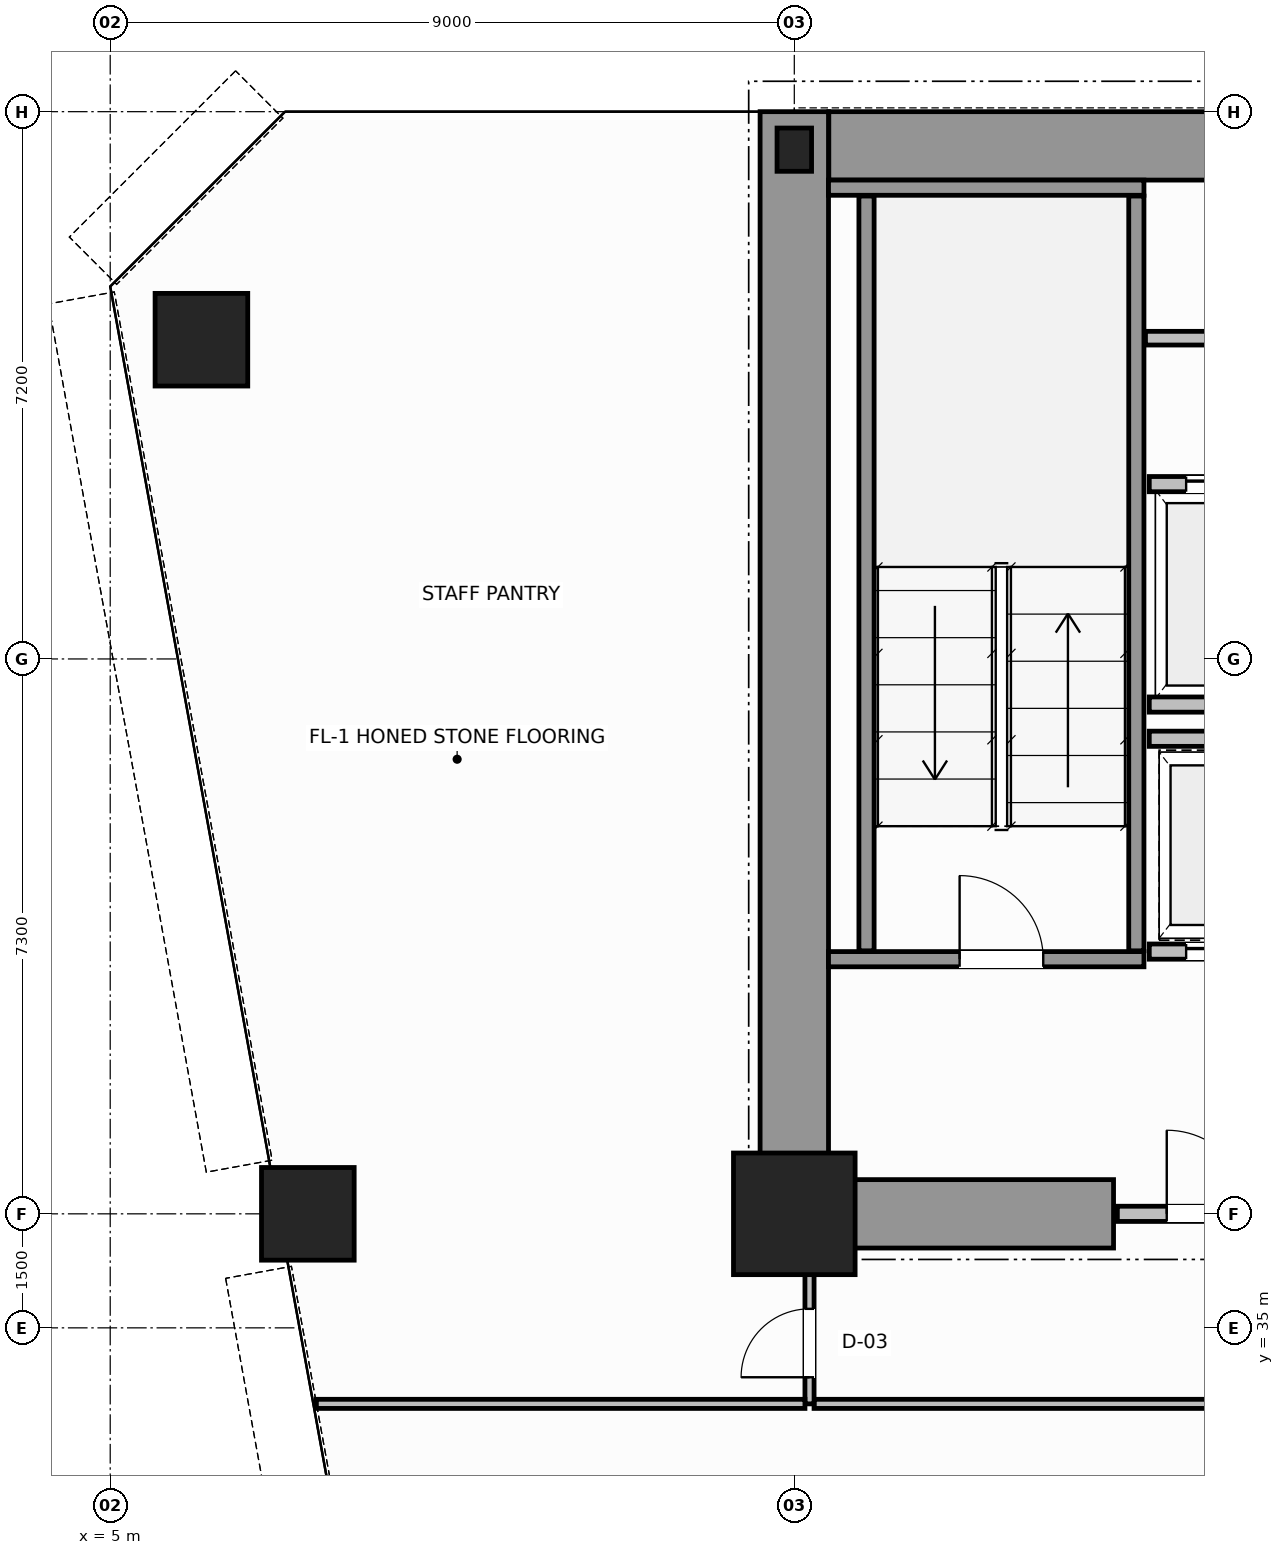
"""IFC4 building model, lengths in metres.
Left out: names, types, materials, properties, quantities, classifications, styles, units other than length and angle.
Written with IfcOpenShell. Run it as: python <this file> out.ifc"""

import sys

from ifc_helpers import new_model, si_unit, direction, frame, frame_2d, origin, origin_2d, place, context, subcontext, project, spatial, rectangle, hollow_circle, i_section, extrude, source, transform, mapped, element, fill, save


model = new_model("IFC4")
c1 = context("Model", 3, precision=1e-05, world=origin(), true_north=direction((0.0, 1.0)))
c2 = subcontext(c1, "Body", "Model", "MODEL_VIEW")
j1 = project(units=[si_unit("LENGTHUNIT", "METRE"), si_unit("PLANEANGLEUNIT", "RADIAN")], contexts=[c1])
p1 = place(None, origin())
s1 = spatial("IfcSite", under=j1, at=p1, CompositionType="ELEMENT")
p2 = place(p1, origin())
s2 = spatial("IfcBuilding", under=s1, at=p2, CompositionType="ELEMENT")
p3 = place(p2, frame((0.0, 0.0, 37.8)))
s3 = spatial("IfcBuildingStorey", under=s2, at=p3, CompositionType="ELEMENT", Elevation=37.8)
m1 = source(origin(), c2, "Body", "SweptSolid", [
    extrude(rectangle(XDim=1.6, YDim=1.6, at=origin_2d()), origin(), (0.0, 0.0, 1.0), 3.8),
])
p4 = place(p3, frame((14.0, 36.5, 0.0), z_axis=(0.0, 0.0, 1.0), x_axis=(1.0, 0.0, 0.0)))
e1 = element("IfcColumn", 1, at=p4, inside=s3, PredefinedType="COLUMN", context=c2, shape_type="MappedRepresentation", body=[
    mapped(m1, transform((0.0, 0.0, 0.0), scale=1.0)),
])
m2 = source(origin(), c2, "Body", "SweptSolid", [
    extrude(i_section(OverallWidth=0.454, OverallDepth=0.569, WebThickness=0.078, FlangeThickness=0.08, FilletRadius=0.015, at=origin_2d()), origin(), (0.0, 0.0, 1.0), 3.8),
])
p5 = place(p3, frame((14.0, 50.5, 0.0), z_axis=(0.0, 0.0, 1.0), x_axis=(1.0, 0.0, 0.0)))
e2 = element("IfcColumn", 2, at=p5, inside=s3, PredefinedType="COLUMN", context=c2, shape_type="MappedRepresentation", body=[
    mapped(m2, transform((0.0, 0.0, 0.0), scale=1.0)),
])
m3 = source(origin(), c2, "Body", "SweptSolid", [
    extrude(hollow_circle(Radius=0.61, WallThickness=0.05, at=origin_2d()), origin(), (0.0, 0.0, 1.0), 3.8),
])
for number, where, z_axis, x_axis in (
    (3, (6.2, 48.0, 0.0), (0.0, 0.0, 1.0), (1.0, 0.0, 0.0)),
    (4, (7.6, 36.5, 0.0), (0.0, 0.0, 1.0), (1.0, 0.0, 0.0)),
):
    element("IfcColumn", number, at=place(p3, frame(where, z_axis=z_axis, x_axis=x_axis)), inside=s3, PredefinedType="COLUMN", context=c2, shape_type="MappedRepresentation", body=[
        mapped(m3, transform((0.0, 0.0, 0.0), scale=1.0)),
    ])
p6 = place(p3, frame((14.454, 50.55, 0.0), z_axis=(0.0, 0.0, 1.0), x_axis=(1.0, 0.0, 0.0)))
e5 = element("IfcWall", 5, at=p6, inside=s3, PredefinedType="SHEAR", context=c2, shape_type="SweptSolid", body=[
    extrude(rectangle(XDim=19.544, YDim=0.9, at=frame_2d((9.772, 0.0))), origin(), (0.0, 0.0, 1.0), 3.8),
])
p7 = place(p3, frame((14.0, 36.5, 0.0), z_axis=(0.0, 0.0, 1.0), x_axis=(0.0, 1.0, 0.0)))
e6 = element("IfcWall", 6, at=p7, inside=s3, PredefinedType="SHEAR", context=c2, shape_type="SweptSolid", body=[
    extrude(rectangle(XDim=14.5, YDim=0.9, at=frame_2d((7.25, 0.0))), origin(), (0.0, 0.0, 1.0), 3.8),
])
p8 = place(p3, frame((14.47, 36.5, 0.0), z_axis=(0.0, 0.0, 1.0), x_axis=(1.0, 0.0, 0.0)))
e7 = element("IfcWall", 7, at=p8, inside=s3, PredefinedType="SHEAR", context=c2, shape_type="SweptSolid", body=[
    extrude(rectangle(XDim=3.73, YDim=0.9, at=frame_2d((1.865, 0.0))), origin(), (0.0, 0.0, 1.0), 2.38),
])
p9 = place(p3, frame((14.45, 39.85, 0.0), z_axis=(0.0, 0.0, 1.0), x_axis=(1.0, 0.0, 0.0)))
e8 = element("IfcWall", 8, at=p9, inside=s3, PredefinedType="SOLIDWALL", context=c2, shape_type="SweptSolid", body=[
    extrude(rectangle(XDim=4.15, YDim=0.2, at=frame_2d((2.075, 0.0))), origin(), (0.0, 0.0, 1.0), 3.8),
])
p10 = place(p9, frame((1.725, 0.0, 0.0)))
e9 = element("IfcOpeningElement", 9, at=p10, cuts=e8, PredefinedType="OPENING", context=c2, shape_type="SweptSolid", body=[
    extrude(rectangle(XDim=1.1, YDim=2.15, at=frame_2d((0.55, 1.075))), frame((0.0, 0.11, 0.0), z_axis=(0.0, -1.0, 0.0), x_axis=(1.0, 0.0, 0.0)), (0.0, 0.0, 1.0), 0.22),
])
p11 = place(p3, frame((14.45, 50.0, 0.0), z_axis=(0.0, 0.0, 1.0), x_axis=(1.0, 0.0, 0.0)))
e10 = element("IfcWall", 10, at=p11, inside=s3, PredefinedType="SOLIDWALL", context=c2, shape_type="SweptSolid", body=[
    extrude(rectangle(XDim=4.15, YDim=0.2, at=frame_2d((2.075, 0.0))), origin(), (0.0, 0.0, 1.0), 3.8),
])
for number, where, z_axis, x_axis in (
    (11, (14.95, 39.96, 0.0), (0.0, 0.0, 1.0), (0.0, 1.0, 0.0)),
    (12, (18.5, 39.96, 0.0), (0.0, 0.0, 1.0), (0.0, 1.0, 0.0)),
):
    element("IfcWall", number, at=place(p3, frame(where, z_axis=z_axis, x_axis=x_axis)), inside=s3, PredefinedType="SOLIDWALL", context=c2, shape_type="SweptSolid", body=[
        extrude(rectangle(XDim=9.93, YDim=0.2, at=frame_2d((4.965, 0.0))), origin(), (0.0, 0.0, 1.0), 3.8),
    ])
p12 = place(p3, frame((18.25, 36.5, 0.0), z_axis=(0.0, 0.0, 1.0), x_axis=(1.0, 0.0, 0.0)))
e13 = element("IfcWall", 13, at=p12, inside=s3, PredefinedType="SOLIDWALL", context=c2, shape_type="SweptSolid", body=[
    extrude(rectangle(XDim=2.47, YDim=0.2, at=frame_2d((1.235, 0.0))), origin(), (0.0, 0.0, 1.0), 2.37),
])
p13 = place(p12, frame((0.65, 0.0, 0.0)))
e14 = element("IfcOpeningElement", 14, at=p13, cuts=e13, PredefinedType="OPENING", context=c2, shape_type="SweptSolid", body=[
    extrude(rectangle(XDim=1.1, YDim=2.15, at=frame_2d((0.55, 1.075))), frame((0.0, 0.11, 0.0), z_axis=(0.0, -1.0, 0.0), x_axis=(1.0, 0.0, 0.0)), (0.0, 0.0, 1.0), 0.22),
])
p14 = place(p3, frame((18.67, 46.1, 0.0), z_axis=(0.0, 0.0, 1.0), x_axis=(1.0, 0.0, 0.0)))
e15 = element("IfcWall", 15, at=p14, inside=s3, PredefinedType="SOLIDWALL", context=c2, shape_type="SweptSolid", body=[
    extrude(rectangle(XDim=2.07, YDim=0.2, at=frame_2d((1.035, 0.0))), origin(), (0.0, 0.0, 1.0), 3.58),
])
p15 = place(p14, frame((0.485, 0.0, 0.0)))
e16 = element("IfcOpeningElement", 16, at=p15, cuts=e15, PredefinedType="OPENING", context=c2, shape_type="SweptSolid", body=[
    extrude(rectangle(XDim=1.1, YDim=2.15, at=frame_2d((0.55, 1.075))), frame((0.0, 0.11, 0.0), z_axis=(0.0, -1.0, 0.0), x_axis=(1.0, 0.0, 0.0)), (0.0, 0.0, 1.0), 0.22),
])
p16 = place(p3, frame((18.67, 43.2, 0.0), z_axis=(0.0, 0.0, 1.0), x_axis=(1.0, 0.0, 0.0)))
e17 = element("IfcWall", 17, at=p16, inside=s3, PredefinedType="SOLIDWALL", context=c2, shape_type="SweptSolid", body=[
    extrude(rectangle(XDim=2.07, YDim=0.2, at=frame_2d((1.035, 0.0))), origin(), (0.0, 0.0, 1.0), 3.58),
])
p17 = place(p3, frame((18.67, 39.95, 0.0), z_axis=(0.0, 0.0, 1.0), x_axis=(1.0, 0.0, 0.0)))
e18 = element("IfcWall", 18, at=p17, inside=s3, PredefinedType="SOLIDWALL", context=c2, shape_type="SweptSolid", body=[
    extrude(rectangle(XDim=2.07, YDim=0.2, at=frame_2d((1.035, 0.0))), origin(), (0.0, 0.0, 1.0), 3.58),
])
p18 = place(p17, frame((0.485, 0.0, 0.0)))
e19 = element("IfcOpeningElement", 19, at=p18, cuts=e18, PredefinedType="OPENING", context=c2, shape_type="SweptSolid", body=[
    extrude(rectangle(XDim=1.1, YDim=2.15, at=frame_2d((0.55, 1.075))), frame((0.0, 0.11, 0.0), z_axis=(0.0, -1.0, 0.0), x_axis=(1.0, 0.0, 0.0)), (0.0, 0.0, 1.0), 0.22),
])
p19 = place(p3, frame((18.67, 42.75, 0.0), z_axis=(0.0, 0.0, 1.0), x_axis=(1.0, 0.0, 0.0)))
e20 = element("IfcWall", 20, at=p19, inside=s3, PredefinedType="SOLIDWALL", context=c2, shape_type="SweptSolid", body=[
    extrude(rectangle(XDim=2.07, YDim=0.2, at=frame_2d((1.035, 0.0))), origin(), (0.0, 0.0, 1.0), 3.58),
])
p20 = place(p3, frame((18.62, 48.02, 0.0), z_axis=(0.0, 0.0, 1.0), x_axis=(1.0, 0.0, 0.0)))
e21 = element("IfcWall", 21, at=p20, inside=s3, PredefinedType="PLUMBINGWALL", context=c2, shape_type="SweptSolid", body=[
    extrude(rectangle(XDim=30.76, YDim=0.18, at=frame_2d((15.38, 0.0))), origin(), (0.0, 0.0, 1.0), 3.58),
])
p21 = place(p20, frame((1.955, 0.0, 0.0)))
e22 = element("IfcOpeningElement", 22, at=p21, cuts=e21, PredefinedType="OPENING", context=c2, shape_type="SweptSolid", body=[
    extrude(rectangle(XDim=0.9, YDim=2.15, at=frame_2d((0.45, 1.075))), frame((0.0, 0.1, 0.0), z_axis=(0.0, -1.0, 0.0), x_axis=(1.0, 0.0, 0.0)), (0.0, 0.0, 1.0), 0.2),
])
p22 = place(p20, frame((8.03, 0.0, 0.0)))
e23 = element("IfcOpeningElement", 23, at=p22, cuts=e21, PredefinedType="OPENING", context=c2, shape_type="SweptSolid", body=[
    extrude(rectangle(XDim=0.9, YDim=2.15, at=frame_2d((0.45, 1.075))), frame((0.0, 0.1, 0.0), z_axis=(0.0, -1.0, 0.0), x_axis=(1.0, 0.0, 0.0)), (0.0, 0.0, 1.0), 0.2),
])
p23 = place(p20, frame((16.93, 0.0, 0.0)))
e24 = element("IfcOpeningElement", 24, at=p23, cuts=e21, PredefinedType="OPENING", context=c2, shape_type="SweptSolid", body=[
    extrude(rectangle(XDim=0.9, YDim=2.15, at=frame_2d((0.45, 1.075))), frame((0.0, 0.1, 0.0), z_axis=(0.0, -1.0, 0.0), x_axis=(1.0, 0.0, 0.0)), (0.0, 0.0, 1.0), 0.2),
])
p24 = place(p20, frame((26.205, 0.0, 0.0)))
e25 = element("IfcOpeningElement", 25, at=p24, cuts=e21, PredefinedType="OPENING", context=c2, shape_type="SweptSolid", body=[
    extrude(rectangle(XDim=0.9, YDim=2.15, at=frame_2d((0.45, 1.075))), frame((0.0, 0.1, 0.0), z_axis=(0.0, -1.0, 0.0), x_axis=(1.0, 0.0, 0.0)), (0.0, 0.0, 1.0), 0.2),
])
p25 = place(p3, frame((14.26, 34.0, 0.0), z_axis=(0.0, 0.0, 1.0), x_axis=(1.0, 0.0, 0.0)))
e26 = element("IfcWall", 26, at=p25, inside=s3, PredefinedType="PARTITIONING", context=c2, shape_type="SweptSolid", body=[
    extrude(rectangle(XDim=18.88, YDim=0.12, at=frame_2d((9.44, 0.0))), origin(), (0.0, 0.0, 1.0), 3.58),
])
p26 = place(p3, frame((14.2, 34.0, 0.0), z_axis=(0.0, 0.0, 1.0), x_axis=(0.0, 1.0, 0.0)))
e27 = element("IfcWall", 27, at=p26, inside=s3, PredefinedType="PARTITIONING", context=c2, shape_type="SweptSolid", body=[
    extrude(rectangle(XDim=2.44, YDim=0.12, at=frame_2d((1.22, 0.0))), origin(), (0.0, 0.0, 1.0), 3.58),
])
p27 = place(p26, frame((0.35, 0.0, 0.0)))
e28 = element("IfcOpeningElement", 28, at=p27, cuts=e27, PredefinedType="OPENING", context=c2, shape_type="SweptSolid", body=[
    extrude(rectangle(XDim=0.9, YDim=2.15, at=frame_2d((0.45, 1.075))), frame((0.0, 0.07, 0.0), z_axis=(0.0, -1.0, 0.0), x_axis=(1.0, 0.0, 0.0)), (0.0, 0.0, 1.0), 0.14),
])
p28 = place(p3, frame((7.712, 34.0, 0.0), z_axis=(0.0, 0.0, 1.0), x_axis=(1.0, 0.0, 0.0)))
e29 = element("IfcWall", 29, at=p28, inside=s3, PredefinedType="PARTITIONING", context=c2, shape_type="SweptSolid", body=[
    extrude(rectangle(XDim=6.427, YDim=0.12, at=frame_2d((3.214, 0.0))), origin(), (0.0, 0.0, 1.0), 3.58),
])
m4 = source(origin(), c2, "Body", "SweptSolid", [
    extrude(rectangle(XDim=1.1, YDim=2.15, at=frame_2d((0.55, 1.075))), frame((0.0, 0.025, 0.0), z_axis=(0.0, -1.0, 0.0), x_axis=(1.0, 0.0, 0.0)), (0.0, 0.0, 1.0), 0.05),
])
p29 = place(p10, origin())
e30 = element("IfcDoor", 30, at=p29, inside=s3, OperationType="SINGLE_SWING_LEFT", PredefinedType="DOOR", context=c2, shape_type="MappedRepresentation", body=[
    mapped(m4, transform((0.0, 0.0, 0.0), scale=1.0)),
])
fill(e9, e30)
p30 = place(p13, origin())
e31 = element("IfcDoor", 31, at=p30, inside=s3, OperationType="SINGLE_SWING_RIGHT", PredefinedType="DOOR", context=c2, shape_type="MappedRepresentation", body=[
    mapped(m4, transform((0.0, 0.0, 0.0), scale=1.0)),
])
fill(e14, e31)
p31 = place(p15, origin())
e32 = element("IfcDoor", 32, at=p31, inside=s3, OperationType="DOUBLE_DOOR_SLIDING", PredefinedType="DOOR", context=c2, shape_type="MappedRepresentation", body=[
    mapped(m4, transform((0.0, 0.0, 0.0), scale=1.0)),
])
fill(e16, e32)
p32 = place(p18, origin())
e33 = element("IfcDoor", 33, at=p32, inside=s3, OperationType="DOUBLE_DOOR_SLIDING", PredefinedType="DOOR", context=c2, shape_type="MappedRepresentation", body=[
    mapped(m4, transform((0.0, 0.0, 0.0), scale=1.0)),
])
fill(e19, e33)
m5 = source(origin(), c2, "Body", "SweptSolid", [
    extrude(rectangle(XDim=0.9, YDim=2.15, at=frame_2d((0.45, 1.075))), frame((0.0, 0.025, 0.0), z_axis=(0.0, -1.0, 0.0), x_axis=(1.0, 0.0, 0.0)), (0.0, 0.0, 1.0), 0.05),
])
p33 = place(p27, origin())
e34 = element("IfcDoor", 34, at=p33, inside=s3, OperationType="SINGLE_SWING_LEFT", PredefinedType="DOOR", context=c2, shape_type="MappedRepresentation", body=[
    mapped(m5, transform((0.0, 0.0, 0.0), scale=1.0)),
])
fill(e28, e34)
save(model, sys.argv[1])
